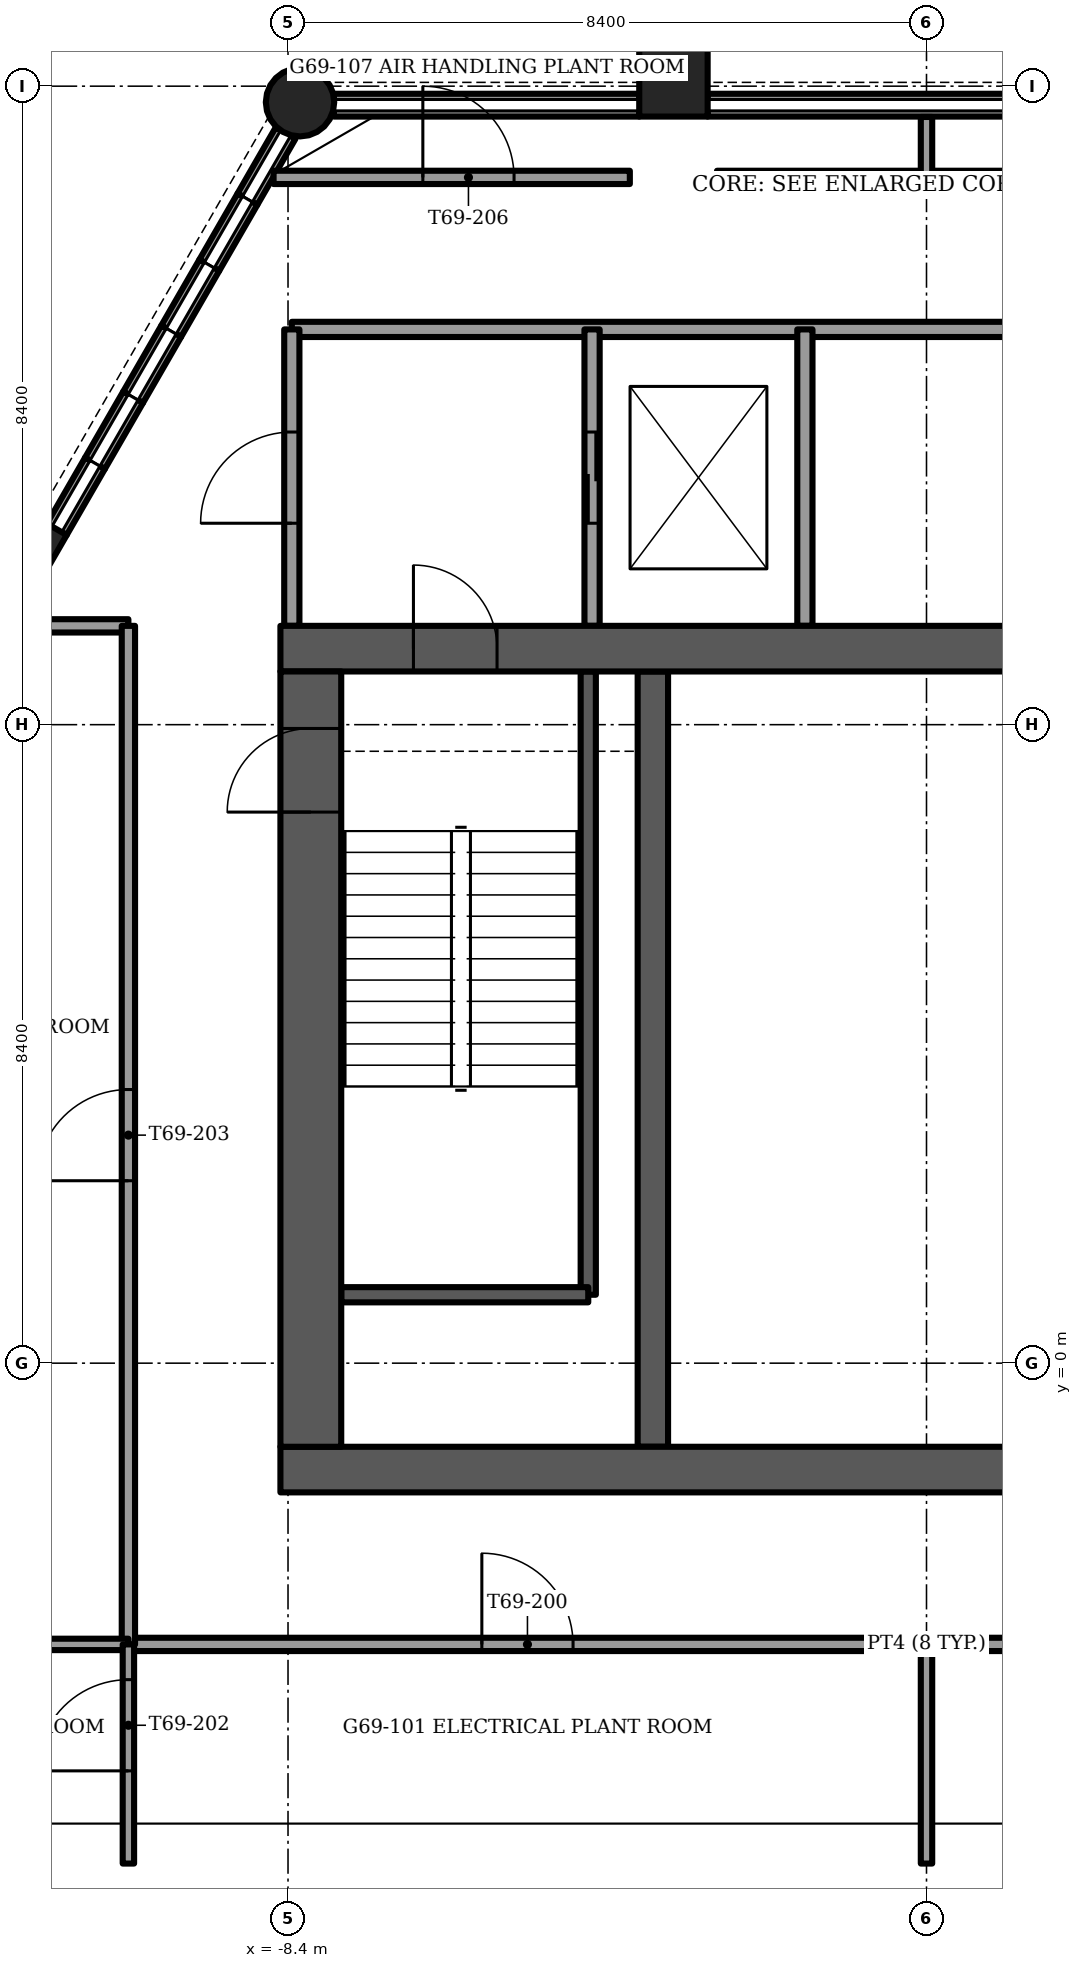
"""IFC4 building model, lengths in metres.
Left out: names, types, materials, properties, quantities, classifications, styles, units other than length and angle.
Written with IfcOpenShell. Run it as: python <this file> out.ifc"""

import sys

from ifc_helpers import new_model, si_unit, direction, frame, frame_2d, origin, origin_2d, place, context, subcontext, project, spatial, rectangle, circle, extrude, element, fill, save


model = new_model("IFC4")
c1 = context("Model", 3, precision=1e-05, world=origin(), true_north=direction((0.0, 1.0)))
c2 = subcontext(c1, "Body", "Model", "MODEL_VIEW")
j1 = project(units=[si_unit("LENGTHUNIT", "METRE"), si_unit("PLANEANGLEUNIT", "RADIAN")], contexts=[c1])
p1 = place(None, origin())
s1 = spatial("IfcSite", under=j1, at=p1, CompositionType="ELEMENT")
p2 = place(p1, origin())
s2 = spatial("IfcBuilding", under=s1, at=p2, CompositionType="ELEMENT")
p3 = place(p2, frame((0.0, 0.0, 279.5)))
s3 = spatial("IfcBuildingStorey", under=s2, at=p3, CompositionType="ELEMENT", Elevation=279.5)
p4 = place(p3, frame((-8.5, -1.4, -0.3), z_axis=(0.0, 0.0, 1.0), x_axis=(1.0, 0.0, 0.0)))
e1 = element("IfcWall", 1, at=p4, inside=s3, PredefinedType="SHEAR", context=c2, shape_type="SweptSolid", body=[
    extrude(rectangle(XDim=17.0, YDim=0.6, at=frame_2d((8.5, 0.0))), origin(), (0.0, 0.0, 1.0), 4.5),
])
p5 = place(p3, frame((-8.5, 9.4, -0.3), z_axis=(0.0, 0.0, 1.0), x_axis=(1.0, 0.0, 0.0)))
e2 = element("IfcWall", 2, at=p5, inside=s3, PredefinedType="SHEAR", context=c2, shape_type="SweptSolid", body=[
    extrude(rectangle(XDim=17.0, YDim=0.6, at=frame_2d((8.5, 0.0))), origin(), (0.0, 0.0, 1.0), 4.5),
])
p6 = place(p5, frame((1.75, 0.0, 0.0)))
e3 = element("IfcOpeningElement", 3, at=p6, cuts=e2, PredefinedType="OPENING", context=c2, shape_type="SweptSolid", body=[
    extrude(rectangle(XDim=1.1, YDim=2.1, at=frame_2d((0.55, 1.05))), frame((0.0, 0.3, 0.0), z_axis=(0.0, -1.0, 0.0), x_axis=(1.0, 0.0, 0.0)), (0.0, 0.0, 1.0), 0.6),
])
p7 = place(p5, frame((14.15, 0.0, 0.0)))
e4 = element("IfcOpeningElement", 4, at=p7, cuts=e2, PredefinedType="OPENING", context=c2, shape_type="SweptSolid", body=[
    extrude(rectangle(XDim=1.1, YDim=2.1, at=frame_2d((0.55, 1.05))), frame((0.0, 0.3, 0.0), z_axis=(0.0, -1.0, 0.0), x_axis=(1.0, 0.0, 0.0)), (0.0, 0.0, 1.0), 0.6),
])
p8 = place(p3, frame((-8.1, -1.1, -0.3), z_axis=(0.0, 0.0, 1.0), x_axis=(0.0, 1.0, 0.0)))
e5 = element("IfcWall", 5, at=p8, inside=s3, PredefinedType="SHEAR", context=c2, shape_type="SweptSolid", body=[
    extrude(rectangle(XDim=10.2, YDim=0.8, at=frame_2d((5.1, 0.0))), origin(), (0.0, 0.0, 1.0), 4.5),
])
p9 = place(p8, frame((8.35, 0.0, 0.0)))
e6 = element("IfcOpeningElement", 6, at=p9, cuts=e5, PredefinedType="OPENING", context=c2, shape_type="SweptSolid", body=[
    extrude(rectangle(XDim=1.1, YDim=2.1, at=frame_2d((0.55, 1.05))), frame((0.0, 0.4, 0.0), z_axis=(0.0, -1.0, 0.0), x_axis=(1.0, 0.0, 0.0)), (0.0, 0.0, 1.0), 0.8),
])
p10 = place(p3, frame((-3.6, -1.1, -0.3), z_axis=(0.0, 0.0, 1.0), x_axis=(0.0, 1.0, 0.0)))
e7 = element("IfcWall", 7, at=p10, inside=s3, PredefinedType="SHEAR", context=c2, shape_type="SweptSolid", body=[
    extrude(rectangle(XDim=10.2, YDim=0.4, at=frame_2d((5.1, 0.0))), origin(), (0.0, 0.0, 1.0), 4.5),
])
p11 = place(p3, frame((-8.242, 16.589, -1.2), z_axis=(0.0, 0.0, 1.0), x_axis=(1.0, 0.0, 0.0)))
e8 = element("IfcColumn", 8, at=p11, inside=s3, PredefinedType="COLUMN", context=c2, shape_type="SweptSolid", body=[
    extrude(circle(Radius=0.45, at=origin_2d()), origin(), (0.0, 0.0, 1.0), 4.5),
])
for number, where, z_axis, x_axis in (
    (9, (-3.329, 16.85, -1.2), (0.0, 0.0, 1.0), (1.0, 0.0, 0.0)),
    (10, (-11.926, 10.73, -1.2), (0.0, 0.0, 1.0), (0.5, 0.866, 0.0)),
):
    element("IfcColumn", number, at=place(p3, frame(where, z_axis=z_axis, x_axis=x_axis)), inside=s3, PredefinedType="COLUMN", context=c2, shape_type="SweptSolid", body=[
        extrude(rectangle(XDim=0.9, YDim=0.9, at=origin_2d()), origin(), (0.0, 0.0, 1.0), 4.5),
    ])
p12 = place(p3, frame((2.879, 16.55, 0.0), z_axis=(0.0, 0.0, 1.0), x_axis=(-1.0, 0.0, 0.0)))
e11 = element("IfcWall", 11, at=p12, inside=s3, PredefinedType="SOLIDWALL", context=c2, shape_type="SweptSolid", body=[
    extrude(rectangle(XDim=5.759, YDim=0.3, at=frame_2d((2.879, 0.0))), origin(), (0.0, 0.0, 1.0), 1.0),
])
p13 = place(p3, frame((-3.779, 16.55, 0.0), z_axis=(0.0, 0.0, 1.0), x_axis=(-1.0, 0.0, 0.0)))
e12 = element("IfcWall", 12, at=p13, inside=s3, PredefinedType="SOLIDWALL", context=c2, shape_type="SweptSolid", body=[
    extrude(rectangle(XDim=4.017, YDim=0.3, at=frame_2d((2.008, 0.0))), origin(), (0.0, 0.0, 1.0), 1.0),
])
p14 = place(p3, frame((-8.432, 16.182, 0.0), z_axis=(0.0, 0.0, 1.0), x_axis=(-0.500143783026, -0.865942374699, 0.0)))
e13 = element("IfcWall", 13, at=p14, inside=s3, PredefinedType="SOLIDWALL", context=c2, shape_type="SweptSolid", body=[
    extrude(rectangle(XDim=1.003, YDim=0.3, at=frame_2d((0.501, 0.0))), origin(), (0.0, 0.0, 1.0), 1.0),
])
p15 = place(p3, frame((-8.934, 15.314, 0.0), z_axis=(0.0, 0.0, 1.0), x_axis=(-0.500038395149, -0.8660032352, 0.0)))
e14 = element("IfcWall", 14, at=p15, inside=s3, PredefinedType="SOLIDWALL", context=c2, shape_type="SweptSolid", body=[
    extrude(rectangle(XDim=1.003, YDim=0.3, at=frame_2d((0.502, 0.0))), origin(), (0.0, 0.0, 1.0), 1.0),
])
p16 = place(p3, frame((-9.435, 14.445, 0.0), z_axis=(0.0, 0.0, 1.0), x_axis=(-0.499961250474, -0.866047774678, 0.0)))
e15 = element("IfcWall", 15, at=p16, inside=s3, PredefinedType="SOLIDWALL", context=c2, shape_type="SweptSolid", body=[
    extrude(rectangle(XDim=1.003, YDim=0.3, at=frame_2d((0.501, 0.0))), origin(), (0.0, 0.0, 1.0), 1.0),
])
for number, where, z_axis, x_axis in (
    (16, (-9.937, 13.576, 0.0), (0.0, 0.0, 1.0), (-0.5, -0.866, 0.0)),
    (17, (-10.438, 12.707, 0.0), (0.0, 0.0, 1.0), (-0.5, -0.866, 0.0)),
    (18, (-10.94, 11.839, 0.0), (0.0, 0.0, 1.0), (-0.5, -0.866, 0.0)),
):
    element("IfcWall", number, at=place(p3, frame(where, z_axis=z_axis, x_axis=x_axis)), inside=s3, PredefinedType="SOLIDWALL", context=c2, shape_type="SweptSolid", body=[
        extrude(rectangle(XDim=1.003, YDim=0.3, at=frame_2d((0.501, 0.0))), origin(), (0.0, 0.0, 1.0), 1.0),
    ])
p17 = place(p3, frame((-10.5, -3.7, 0.0), z_axis=(0.0, 0.0, 1.0), x_axis=(1.0, 0.0, 0.0)))
e19 = element("IfcWall", 19, at=p17, inside=s3, PredefinedType="PARTITIONING", context=c2, shape_type="SweptSolid", body=[
    extrude(rectangle(XDim=21.0, YDim=0.175, at=frame_2d((10.5, 0.0))), origin(), (0.0, 0.0, 1.0), 4.2),
])
p18 = place(p17, frame((4.65, 0.0, 0.0)))
e20 = element("IfcOpeningElement", 20, at=p18, cuts=e19, PredefinedType="OPENING", context=c2, shape_type="SweptSolid", body=[
    extrude(rectangle(XDim=1.2, YDim=2.1, at=frame_2d((0.6, 1.05))), frame((0.0, 0.087, 0.0), z_axis=(0.0, -1.0, 0.0), x_axis=(1.0, 0.0, 0.0)), (0.0, 0.0, 1.0), 0.175),
])
p19 = place(p17, frame((15.15, 0.0, 0.0)))
e21 = element("IfcOpeningElement", 21, at=p19, cuts=e19, PredefinedType="OPENING", context=c2, shape_type="SweptSolid", body=[
    extrude(rectangle(XDim=1.2, YDim=2.1, at=frame_2d((0.6, 1.05))), frame((0.0, 0.087, 0.0), z_axis=(0.0, -1.0, 0.0), x_axis=(1.0, 0.0, 0.0)), (0.0, 0.0, 1.0), 0.175),
])
p20 = place(p3, frame((-11.996, 9.7, 0.0), z_axis=(0.0, 0.0, 1.0), x_axis=(1.0, 0.0, 0.0)))
e22 = element("IfcWall", 22, at=p20, inside=s3, PredefinedType="PARTITIONING", context=c2, shape_type="SweptSolid", body=[
    extrude(rectangle(XDim=1.496, YDim=0.175, at=frame_2d((0.748, 0.0))), origin(), (0.0, 0.0, 1.0), 4.2),
])
p21 = place(p3, frame((-8.59, 15.6, 0.0), z_axis=(0.0, 0.0, 1.0), x_axis=(1.0, 0.0, 0.0)))
e23 = element("IfcWall", 23, at=p21, inside=s3, PredefinedType="PARTITIONING", context=c2, shape_type="SweptSolid", body=[
    extrude(rectangle(XDim=4.687, YDim=0.175, at=frame_2d((2.344, 0.0))), origin(), (0.0, 0.0, 1.0), 4.2),
])
p22 = place(p21, frame((1.964, 0.0, 0.0)))
e24 = element("IfcOpeningElement", 24, at=p22, cuts=e23, PredefinedType="OPENING", context=c2, shape_type="SweptSolid", body=[
    extrude(rectangle(XDim=1.2, YDim=2.1, at=frame_2d((0.6, 1.05))), frame((0.0, 0.087, 0.0), z_axis=(0.0, -1.0, 0.0), x_axis=(1.0, 0.0, 0.0)), (0.0, 0.0, 1.0), 0.175),
])
p23 = place(p3, frame((-2.756, 15.6, 0.0), z_axis=(0.0, 0.0, 1.0), x_axis=(1.0, 0.0, 0.0)))
e25 = element("IfcWall", 25, at=p23, inside=s3, PredefinedType="PARTITIONING", context=c2, shape_type="SweptSolid", body=[
    extrude(rectangle(XDim=5.512, YDim=0.175, at=frame_2d((2.756, 0.0))), origin(), (0.0, 0.0, 1.0), 4.2),
])
p24 = place(p3, frame((-10.5, -3.7, 0.0), z_axis=(0.0, 0.0, 1.0), x_axis=(0.0, 1.0, 0.0)))
e26 = element("IfcWall", 26, at=p24, inside=s3, PredefinedType="PARTITIONING", context=c2, shape_type="SweptSolid", body=[
    extrude(rectangle(XDim=13.4, YDim=0.175, at=frame_2d((6.7, 0.0))), origin(), (0.0, 0.0, 1.0), 4.2),
])
p25 = place(p24, frame((6.1, 0.0, 0.0)))
e27 = element("IfcOpeningElement", 27, at=p25, cuts=e26, PredefinedType="OPENING", context=c2, shape_type="SweptSolid", body=[
    extrude(rectangle(XDim=1.2, YDim=2.1, at=frame_2d((0.6, 1.05))), frame((0.0, 0.087, 0.0), z_axis=(0.0, -1.0, 0.0), x_axis=(1.0, 0.0, 0.0)), (0.0, 0.0, 1.0), 0.175),
])
p26 = place(p3, frame((-16.796, -3.7, 0.0), z_axis=(0.0, 0.0, 1.0), x_axis=(1.0, 0.0, 0.0)))
e28 = element("IfcWall", 28, at=p26, inside=s3, PredefinedType="PARTITIONING", context=c2, shape_type="SweptSolid", body=[
    extrude(rectangle(XDim=6.296, YDim=0.15, at=frame_2d((3.148, 0.0))), origin(), (0.0, 0.0, 1.0), 4.2),
])
p27 = place(p3, frame((-10.5, -6.583, 0.0), z_axis=(0.0, 0.0, 1.0), x_axis=(0.0, 1.0, 0.0)))
e29 = element("IfcWall", 29, at=p27, inside=s3, PredefinedType="PARTITIONING", context=c2, shape_type="SweptSolid", body=[
    extrude(rectangle(XDim=2.883, YDim=0.15, at=frame_2d((1.442, 0.0))), origin(), (0.0, 0.0, 1.0), 4.155),
])
p28 = place(p27, frame((1.219, 0.0, 0.0)))
e30 = element("IfcOpeningElement", 30, at=p28, cuts=e29, PredefinedType="OPENING", context=c2, shape_type="SweptSolid", body=[
    extrude(rectangle(XDim=1.2, YDim=2.1, at=frame_2d((0.6, 1.05))), frame((0.0, 0.075, 0.0), z_axis=(0.0, -1.0, 0.0), x_axis=(1.0, 0.0, 0.0)), (0.0, 0.0, 1.0), 0.15),
])
p29 = place(p3, frame((0.0, -6.583, 0.0), z_axis=(0.0, 0.0, 1.0), x_axis=(0.0, 1.0, 0.0)))
e31 = element("IfcWall", 31, at=p29, inside=s3, PredefinedType="PARTITIONING", context=c2, shape_type="SweptSolid", body=[
    extrude(rectangle(XDim=2.883, YDim=0.15, at=frame_2d((1.442, 0.0))), origin(), (0.0, 0.0, 1.0), 4.155),
])
p30 = place(p3, frame((0.0, 15.6, 0.0), z_axis=(0.0, 0.0, 1.0), x_axis=(0.0, 1.0, 0.0)))
e32 = element("IfcWall", 32, at=p30, inside=s3, PredefinedType="PARTITIONING", context=c2, shape_type="SweptSolid", body=[
    extrude(rectangle(XDim=0.795, YDim=0.15, at=frame_2d((0.397, 0.0))), origin(), (0.0, 0.0, 1.0), 4.2),
])
p31 = place(p3, frame((-4.45, 0.9, -0.3), z_axis=(0.0, 0.0, 1.0), x_axis=(0.0, 1.0, 0.0)))
e33 = element("IfcWall", 33, at=p31, inside=s3, PredefinedType="SOLIDWALL", context=c2, shape_type="SweptSolid", body=[
    extrude(rectangle(XDim=8.2, YDim=0.2, at=frame_2d((4.1, 0.0))), origin(), (0.0, 0.0, 1.0), 4.5),
])
p32 = place(p3, frame((-7.7, 0.9, -0.3), z_axis=(0.0, 0.0, 1.0), x_axis=(1.0, 0.0, 0.0)))
e34 = element("IfcWall", 34, at=p32, inside=s3, PredefinedType="SOLIDWALL", context=c2, shape_type="SweptSolid", body=[
    extrude(rectangle(XDim=3.25, YDim=0.2, at=frame_2d((1.625, 0.0))), origin(), (0.0, 0.0, 1.0), 4.5),
])
p33 = place(p3, frame((-8.35, 13.6, 0.0), z_axis=(0.0, 0.0, 1.0), x_axis=(1.0, 0.0, 0.0)))
e35 = element("IfcWall", 35, at=p33, inside=s3, PredefinedType="PARTITIONING", context=c2, shape_type="SweptSolid", body=[
    extrude(rectangle(XDim=16.7, YDim=0.2, at=frame_2d((8.35, 0.0))), origin(), (0.0, 0.0, 1.0), 4.2),
])
p34 = place(p3, frame((-8.35, 9.7, 0.0), z_axis=(0.0, 0.0, 1.0), x_axis=(0.0, 1.0, 0.0)))
e36 = element("IfcWall", 36, at=p34, inside=s3, PredefinedType="PARTITIONING", context=c2, shape_type="SweptSolid", body=[
    extrude(rectangle(XDim=3.9, YDim=0.2, at=frame_2d((1.95, 0.0))), origin(), (0.0, 0.0, 1.0), 4.2),
])
p35 = place(p34, frame((1.35, 0.0, 0.0)))
e37 = element("IfcOpeningElement", 37, at=p35, cuts=e36, PredefinedType="OPENING", context=c2, shape_type="SweptSolid", body=[
    extrude(rectangle(XDim=1.2, YDim=2.1, at=frame_2d((0.6, 1.05))), frame((0.0, 0.1, 0.0), z_axis=(0.0, -1.0, 0.0), x_axis=(1.0, 0.0, 0.0)), (0.0, 0.0, 1.0), 0.2),
])
p36 = place(p3, frame((-4.4, 9.7, 0.0), z_axis=(0.0, 0.0, 1.0), x_axis=(0.0, 1.0, 0.0)))
e38 = element("IfcWall", 38, at=p36, inside=s3, PredefinedType="PARTITIONING", context=c2, shape_type="SweptSolid", body=[
    extrude(rectangle(XDim=3.9, YDim=0.2, at=frame_2d((1.95, 0.0))), origin(), (0.0, 0.0, 1.0), 4.2),
])
p37 = place(p36, frame((1.35, 0.0, 0.0)))
e39 = element("IfcOpeningElement", 39, at=p37, cuts=e38, PredefinedType="OPENING", context=c2, shape_type="SweptSolid", body=[
    extrude(rectangle(XDim=1.2, YDim=2.1, at=frame_2d((0.6, 1.05))), frame((0.0, 0.1, 0.0), z_axis=(0.0, -1.0, 0.0), x_axis=(1.0, 0.0, 0.0)), (0.0, 0.0, 1.0), 0.2),
])
p38 = place(p3, frame((-1.6, 9.7, 0.0), z_axis=(0.0, 0.0, 1.0), x_axis=(0.0, 1.0, 0.0)))
e40 = element("IfcWall", 40, at=p38, inside=s3, PredefinedType="PARTITIONING", context=c2, shape_type="SweptSolid", body=[
    extrude(rectangle(XDim=3.9, YDim=0.2, at=frame_2d((1.95, 0.0))), origin(), (0.0, 0.0, 1.0), 4.2),
])
p39 = place(p18, origin())
e41 = element("IfcDoor", 41, at=p39, inside=s3, OperationType="SINGLE_SWING_RIGHT", PredefinedType="DOOR", context=c2, shape_type="SweptSolid", body=[
    extrude(rectangle(XDim=1.2, YDim=2.1, at=frame_2d((0.6, 1.05))), frame((0.0, 0.025, 0.0), z_axis=(0.0, -1.0, 0.0), x_axis=(1.0, 0.0, 0.0)), (0.0, 0.0, 1.0), 0.05),
])
fill(e20, e41)
p40 = place(p28, origin())
e42 = element("IfcDoor", 42, at=p40, inside=s3, OperationType="SINGLE_SWING_RIGHT", PredefinedType="DOOR", context=c2, shape_type="SweptSolid", body=[
    extrude(rectangle(XDim=1.2, YDim=2.1, at=frame_2d((0.6, 1.05))), frame((0.0, 0.025, 0.0), z_axis=(0.0, -1.0, 0.0), x_axis=(1.0, 0.0, 0.0)), (0.0, 0.0, 1.0), 0.05),
])
fill(e30, e42)
p41 = place(p25, origin())
e43 = element("IfcDoor", 43, at=p41, inside=s3, OperationType="SINGLE_SWING_LEFT", PredefinedType="DOOR", context=c2, shape_type="SweptSolid", body=[
    extrude(rectangle(XDim=1.2, YDim=2.1, at=frame_2d((0.6, 1.05))), frame((0.0, 0.025, 0.0), z_axis=(0.0, -1.0, 0.0), x_axis=(1.0, 0.0, 0.0)), (0.0, 0.0, 1.0), 0.05),
])
fill(e27, e43)
p42 = place(p22, origin())
e44 = element("IfcDoor", 44, at=p42, inside=s3, OperationType="SINGLE_SWING_RIGHT", PredefinedType="DOOR", context=c2, shape_type="SweptSolid", body=[
    extrude(rectangle(XDim=1.2, YDim=2.1, at=frame_2d((0.6, 1.05))), frame((0.0, 0.025, 0.0), z_axis=(0.0, -1.0, 0.0), x_axis=(1.0, 0.0, 0.0)), (0.0, 0.0, 1.0), 0.05),
])
fill(e24, e44)
p43 = place(p6, origin())
e45 = element("IfcDoor", 45, at=p43, inside=s3, OperationType="SINGLE_SWING_LEFT", PredefinedType="DOOR", context=c2, shape_type="SweptSolid", body=[
    extrude(rectangle(XDim=1.1, YDim=2.1, at=frame_2d((0.55, 1.05))), frame((0.0, 0.025, 0.0), z_axis=(0.0, -1.0, 0.0), x_axis=(1.0, 0.0, 0.0)), (0.0, 0.0, 1.0), 0.05),
])
fill(e3, e45)
p44 = place(p9, origin())
e46 = element("IfcDoor", 46, at=p44, inside=s3, OperationType="SINGLE_SWING_RIGHT", PredefinedType="DOOR", context=c2, shape_type="SweptSolid", body=[
    extrude(rectangle(XDim=1.1, YDim=2.1, at=frame_2d((0.55, 1.05))), frame((0.0, 0.025, 0.0), z_axis=(0.0, -1.0, 0.0), x_axis=(1.0, 0.0, 0.0)), (0.0, 0.0, 1.0), 0.05),
])
fill(e6, e46)
p45 = place(p37, origin())
e47 = element("IfcDoor", 47, at=p45, inside=s3, OperationType="SLIDING_TO_LEFT", PredefinedType="DOOR", context=c2, shape_type="SweptSolid", body=[
    extrude(rectangle(XDim=1.2, YDim=2.1, at=frame_2d((0.6, 1.05))), frame((0.0, 0.025, 0.0), z_axis=(0.0, -1.0, 0.0), x_axis=(1.0, 0.0, 0.0)), (0.0, 0.0, 1.0), 0.05),
])
fill(e39, e47)
p46 = place(p35, origin())
e48 = element("IfcDoor", 48, at=p46, inside=s3, OperationType="SINGLE_SWING_LEFT", PredefinedType="DOOR", context=c2, shape_type="SweptSolid", body=[
    extrude(rectangle(XDim=1.2, YDim=2.1, at=frame_2d((0.6, 1.05))), frame((0.0, 0.025, 0.0), z_axis=(0.0, -1.0, 0.0), x_axis=(1.0, 0.0, 0.0)), (0.0, 0.0, 1.0), 0.05),
])
fill(e37, e48)
save(model, sys.argv[1])
